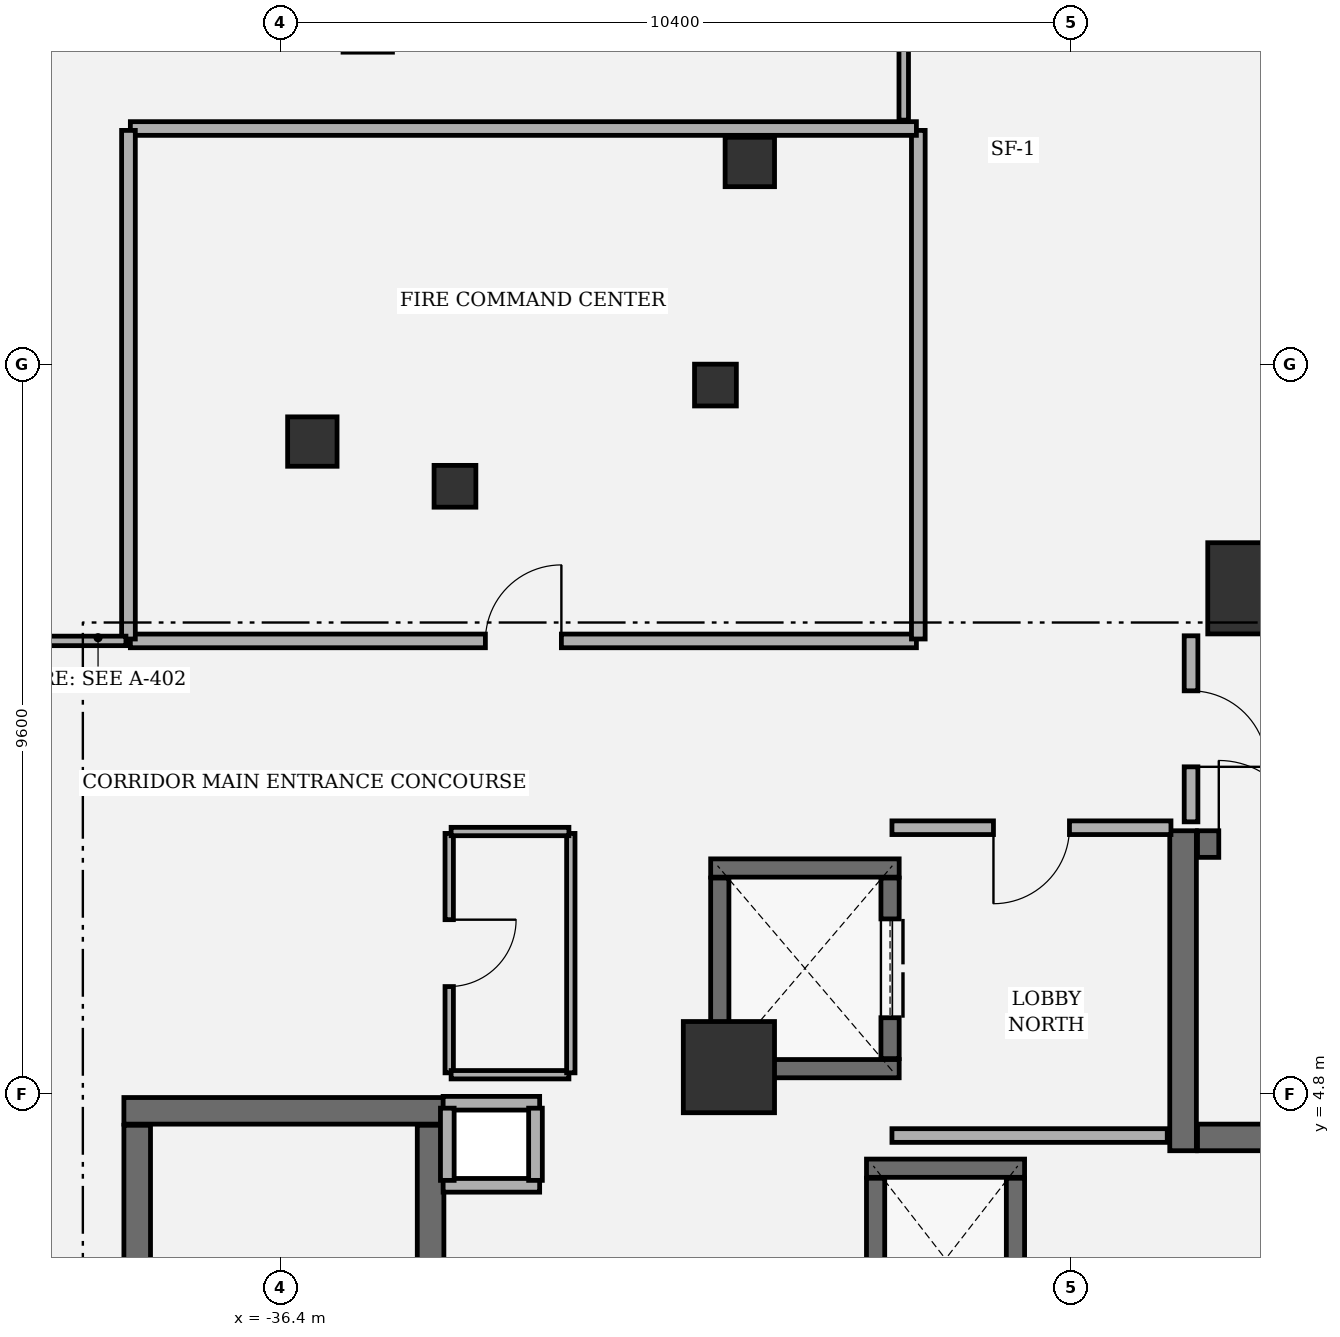
"""IFC4 building model, lengths in metres.
Left out: names, types, materials, properties, quantities, classifications, styles, units other than length and angle.
Written with IfcOpenShell. Run it as: python <this file> out.ifc"""

import sys

from ifc_helpers import new_model, si_unit, direction, frame, frame_2d, origin, origin_2d, place, context, subcontext, project, spatial, rectangle, extrude, element, fill, save


model = new_model("IFC4")
c1 = context("Model", 3, precision=1e-05, world=origin(), true_north=direction((0.0, 1.0)))
c2 = subcontext(c1, "Body", "Model", "MODEL_VIEW")
j1 = project(units=[si_unit("LENGTHUNIT", "METRE"), si_unit("PLANEANGLEUNIT", "RADIAN")], contexts=[c1])
p1 = place(None, origin())
s1 = spatial("IfcSite", under=j1, at=p1, CompositionType="ELEMENT")
p2 = place(p1, origin())
s2 = spatial("IfcBuilding", under=s1, at=p2, CompositionType="ELEMENT")
p3 = place(p2, origin())
s3 = spatial("IfcBuildingStorey", under=s2, at=p3, CompositionType="ELEMENT", Elevation=0.0)
for number, where, z_axis, x_axis in (
    (1, (-23.6, 11.45, 0.0), (0.0, 0.0, 1.0), (1.0, 0.0, 0.0)),
    (2, (-30.5, 5.15, 0.0), (0.0, 0.0, 1.0), (1.0, 0.0, 0.0)),
):
    element("IfcColumn", number, at=place(p3, frame(where, z_axis=z_axis, x_axis=x_axis)), inside=s3, PredefinedType="COLUMN", context=c2, shape_type="SweptSolid", body=[
        extrude(rectangle(XDim=1.2, YDim=1.2, at=origin_2d()), origin(), (0.0, 0.0, 1.0), 6.6),
    ])
for number, where, z_axis, x_axis in (
    (3, (-35.981, 13.381, 0.0), (0.0, 0.0, 1.0), (1.0, 0.0, 0.0)),
    (4, (-30.225, 17.06, 0.0), (0.0, 0.0, 1.0), (1.0, 0.0, 0.0)),
):
    element("IfcColumn", number, at=place(p3, frame(where, z_axis=z_axis, x_axis=x_axis)), inside=s3, PredefinedType="COLUMN", context=c2, shape_type="SweptSolid", body=[
        extrude(rectangle(XDim=0.65, YDim=0.65, at=origin_2d()), origin(), (0.0, 0.0, 1.0), 6.6),
    ])
for number, where, z_axis, x_axis in (
    (5, (-34.104, 12.792, 0.0), (0.0, 0.0, 1.0), (1.0, 0.0, 0.0)),
    (6, (-30.677, 14.124, 0.0), (0.0, 0.0, 1.0), (1.0, 0.0, 0.0)),
):
    element("IfcColumn", number, at=place(p3, frame(where, z_axis=z_axis, x_axis=x_axis)), inside=s3, PredefinedType="COLUMN", context=c2, shape_type="SweptSolid", body=[
        extrude(rectangle(XDim=0.55, YDim=0.55, at=origin_2d()), origin(), (0.0, 0.0, 1.0), 6.6),
    ])
p4 = place(p3, frame((-64.419, 4.637, 0.0), z_axis=(0.0, 0.0, 1.0), x_axis=(0.842602364841, 0.538536214905, 0.0)))
e7 = element("IfcWall", 7, at=p4, inside=s3, PredefinedType="SOLIDWALL", context=c2, shape_type="SweptSolid", body=[
    extrude(rectangle(XDim=60.27, YDim=0.38, at=frame_2d((30.135, 0.0))), origin(), (0.0, 0.0, 1.0), 6.34),
])
p5 = place(p4, frame((51.698, 0.0, 0.0)))
e8 = element("IfcOpeningElement", 8, at=p5, cuts=e7, PredefinedType="OPENING", context=c2, shape_type="SweptSolid", body=[
    extrude(rectangle(XDim=1.8, YDim=2.35, at=frame_2d((0.9, 1.175))), frame((0.0, 0.2, 0.0), z_axis=(0.0, -1.0, 0.0), x_axis=(1.0, 0.0, 0.0)), (0.0, 0.0, 1.0), 0.4),
])
p6 = place(p4, frame((44.021, 0.0, 0.0)))
e9 = element("IfcOpeningElement", 9, at=p6, cuts=e7, PredefinedType="OPENING", context=c2, shape_type="SweptSolid", body=[
    extrude(rectangle(XDim=2.2, YDim=2.4, at=frame_2d((1.1, 1.2))), frame((0.0, 0.2, 0.0), z_axis=(0.0, -1.0, 0.0), x_axis=(1.0, 0.0, 0.0)), (0.0, 0.0, 1.0), 0.4),
])
p7 = place(p3, frame((-24.525, 8.26, 0.0), z_axis=(0.0, 0.0, 1.0), x_axis=(0.0, -1.0, 0.0)))
e10 = element("IfcWall", 10, at=p7, inside=s3, PredefinedType="SHEAR", context=c2, shape_type="SweptSolid", body=[
    extrude(rectangle(XDim=4.21, YDim=0.35, at=frame_2d((2.105, 0.0))), origin(), (0.0, 0.0, 1.0), 6.34),
])
p8 = place(p3, frame((-24.335, 4.225, 0.0), z_axis=(0.0, 0.0, 1.0), x_axis=(1.0, 0.0, 0.0)))
e11 = element("IfcWall", 11, at=p8, inside=s3, PredefinedType="SHEAR", context=c2, shape_type="SweptSolid", body=[
    extrude(rectangle(XDim=8.12, YDim=0.35, at=frame_2d((4.06, 0.0))), origin(), (0.0, 0.0, 1.0), 6.34),
])
p9 = place(p3, frame((-24.335, 8.085, 0.0), z_axis=(0.0, 0.0, 1.0), x_axis=(1.0, 0.0, 0.0)))
e12 = element("IfcWall", 12, at=p9, inside=s3, PredefinedType="SHEAR", context=c2, shape_type="SweptSolid", body=[
    extrude(rectangle(XDim=8.12, YDim=0.35, at=frame_2d((4.06, 0.0))), origin(), (0.0, 0.0, 1.0), 6.34),
])
p10 = place(p9, frame((0.28, 0.0, 0.0)))
e13 = element("IfcOpeningElement", 13, at=p10, cuts=e12, PredefinedType="OPENING", context=c2, shape_type="SweptSolid", body=[
    extrude(rectangle(XDim=1.1, YDim=2.2, at=frame_2d((0.55, 1.1))), frame((0.0, 0.185, 0.0), z_axis=(0.0, -1.0, 0.0), x_axis=(1.0, 0.0, 0.0)), (0.0, 0.0, 1.0), 0.37),
])
p11 = place(p3, frame((-34.25, 4.575, 0.0), z_axis=(0.0, 0.0, 1.0), x_axis=(-1.0, 0.0, 0.0)))
e14 = element("IfcWall", 14, at=p11, inside=s3, PredefinedType="SHEAR", context=c2, shape_type="SweptSolid", body=[
    extrude(rectangle(XDim=4.21, YDim=0.35, at=frame_2d((2.105, 0.0))), origin(), (0.0, 0.0, 1.0), 6.34),
])
for number, where, z_axis, x_axis in (
    (15, (-34.425, -4.385, 0.0), (0.0, 0.0, 1.0), (0.0, 1.0, 0.0)),
    (16, (-38.285, 4.385, 0.0), (0.0, 0.0, 1.0), (0.0, -1.0, 0.0)),
):
    element("IfcWall", number, at=place(p3, frame(where, z_axis=z_axis, x_axis=x_axis)), inside=s3, PredefinedType="SHEAR", context=c2, shape_type="SweptSolid", body=[
        extrude(rectangle(XDim=8.77, YDim=0.35, at=frame_2d((4.385, 0.0))), origin(), (0.0, 0.0, 1.0), 6.34),
    ])
for number, where, z_axis, x_axis in (
    (17, (-28.26, 5.13, 0.0), (0.0, 0.0, 1.0), (-1.0, 0.0, 0.0)),
    (18, (-30.74, 7.77, 0.0), (0.0, 0.0, 1.0), (1.0, 0.0, 0.0)),
):
    element("IfcWall", number, at=place(p3, frame(where, z_axis=z_axis, x_axis=x_axis)), inside=s3, PredefinedType="SHEAR", context=c2, shape_type="SweptSolid", body=[
        extrude(rectangle(XDim=2.48, YDim=0.24, at=frame_2d((1.24, 0.0))), origin(), (0.0, 0.0, 1.0), 6.34),
    ])
p12 = place(p3, frame((-30.62, 5.262, 0.0), z_axis=(0.0, 0.0, 1.0), x_axis=(0.0, 1.0, 0.0)))
e19 = element("IfcWall", 19, at=p12, inside=s3, PredefinedType="SHEAR", context=c2, shape_type="SweptSolid", body=[
    extrude(rectangle(XDim=2.376, YDim=0.24, at=frame_2d((1.188, 0.0))), origin(), (0.0, 0.0, 1.0), 6.34),
])
p13 = place(p3, frame((-28.38, 7.638, 0.0), z_axis=(0.0, 0.0, 1.0), x_axis=(0.0, -1.0, 0.0)))
e20 = element("IfcWall", 20, at=p13, inside=s3, PredefinedType="SHEAR", context=c2, shape_type="SweptSolid", body=[
    extrude(rectangle(XDim=2.376, YDim=0.24, at=frame_2d((1.188, 0.0))), origin(), (0.0, 0.0, 1.0), 6.34),
])
p14 = place(p13, frame((0.538, 0.0, 0.0)))
e21 = element("IfcOpeningElement", 21, at=p14, cuts=e20, PredefinedType="OPENING", context=c2, shape_type="SweptSolid", body=[
    extrude(rectangle(XDim=1.3, YDim=2.3, at=frame_2d((0.65, 1.15))), frame((0.0, 0.13, 0.0), z_axis=(0.0, -1.0, 0.0), x_axis=(1.0, 0.0, 0.0)), (0.0, 0.0, 1.0), 0.26),
])
p15 = place(p3, frame((-28.69, 3.82, 0.0), z_axis=(0.0, 0.0, 1.0), x_axis=(1.0, 0.0, 0.0)))
e22 = element("IfcWall", 22, at=p15, inside=s3, PredefinedType="SHEAR", context=c2, shape_type="SweptSolid", body=[
    extrude(rectangle(XDim=2.08, YDim=0.24, at=frame_2d((1.04, 0.0))), origin(), (0.0, 0.0, 1.0), 6.34),
])
for number, where, z_axis, x_axis in (
    (23, (-28.57, 1.562, 0.0), (0.0, 0.0, 1.0), (0.0, 1.0, 0.0)),
    (24, (-26.73, 3.688, 0.0), (0.0, 0.0, 1.0), (0.0, -1.0, 0.0)),
):
    element("IfcWall", number, at=place(p3, frame(where, z_axis=z_axis, x_axis=x_axis)), inside=s3, PredefinedType="SHEAR", context=c2, shape_type="SweptSolid", body=[
        extrude(rectangle(XDim=2.126, YDim=0.24, at=frame_2d((1.063, 0.0))), origin(), (0.0, 0.0, 1.0), 6.34),
    ])
for number, where, z_axis, x_axis in (
    (25, (-32.99, 3.595, 0.0), (0.0, 0.0, 1.0), (-1.0, 0.0, 0.0)),
    (26, (-34.26, 4.675, 0.0), (0.0, 0.0, 1.0), (1.0, 0.0, 0.0)),
):
    element("IfcWall", number, at=place(p3, frame(where, z_axis=z_axis, x_axis=x_axis)), inside=s3, PredefinedType="PARTITIONING", context=c2, shape_type="SweptSolid", body=[
        extrude(rectangle(XDim=1.27, YDim=0.18, at=frame_2d((0.635, 0.0))), origin(), (0.0, 0.0, 1.0), 6.34),
    ])
for number, where, z_axis, x_axis in (
    (27, (-34.205, 3.66, 0.0), (0.0, 0.0, 1.0), (0.0, 1.0, 0.0)),
    (28, (-33.045, 4.61, 0.0), (0.0, 0.0, 1.0), (0.0, -1.0, 0.0)),
):
    element("IfcWall", number, at=place(p3, frame(where, z_axis=z_axis, x_axis=x_axis)), inside=s3, PredefinedType="PARTITIONING", context=c2, shape_type="SweptSolid", body=[
        extrude(rectangle(XDim=0.95, YDim=0.18, at=frame_2d((0.475, 0.0))), origin(), (0.0, 0.0, 1.0), 6.34),
    ])
p16 = place(p3, frame((-24.42, 10.825, 0.0), z_axis=(0.0, 0.0, 1.0), x_axis=(0.0, -1.0, 0.0)))
e29 = element("IfcWall", 29, at=p16, inside=s3, PredefinedType="PARTITIONING", context=c2, shape_type="SweptSolid", body=[
    extrude(rectangle(XDim=2.448, YDim=0.18, at=frame_2d((1.224, 0.0))), origin(), (0.0, 0.0, 1.0), 5.853),
])
p17 = place(p16, frame((0.724, 0.0, 0.0)))
e30 = element("IfcOpeningElement", 30, at=p17, cuts=e29, PredefinedType="OPENING", context=c2, shape_type="SweptSolid", body=[
    extrude(rectangle(XDim=1.0, YDim=2.15, at=frame_2d((0.5, 1.075))), frame((0.0, 0.1, 0.0), z_axis=(0.0, -1.0, 0.0), x_axis=(1.0, 0.0, 0.0)), (0.0, 0.0, 1.0), 0.2),
])
p18 = place(p3, frame((-28.355, 4.25, 0.0), z_axis=(0.0, 0.0, 1.0), x_axis=(1.0, 0.0, 0.0)))
e31 = element("IfcWall", 31, at=p18, inside=s3, PredefinedType="PARTITIONING", context=c2, shape_type="SweptSolid", body=[
    extrude(rectangle(XDim=3.622, YDim=0.18, at=frame_2d((1.811, 0.0))), origin(), (0.0, 0.0, 1.0), 6.34),
])
p19 = place(p3, frame((-24.684, 8.3, 0.0), z_axis=(0.0, 0.0, 1.0), x_axis=(-1.0, 0.0, 0.0)))
e32 = element("IfcWall", 32, at=p19, inside=s3, PredefinedType="PARTITIONING", context=c2, shape_type="SweptSolid", body=[
    extrude(rectangle(XDim=3.671, YDim=0.18, at=frame_2d((1.835, 0.0))), origin(), (0.0, 0.0, 1.0), 5.853),
])
p20 = place(p19, frame((1.335, 0.0, 0.0)))
e33 = element("IfcOpeningElement", 33, at=p20, cuts=e32, PredefinedType="OPENING", context=c2, shape_type="SweptSolid", body=[
    extrude(rectangle(XDim=1.0, YDim=2.15, at=frame_2d((0.5, 1.075))), frame((0.0, 0.1, 0.0), z_axis=(0.0, -1.0, 0.0), x_axis=(1.0, 0.0, 0.0)), (0.0, 0.0, 1.0), 0.2),
])
p21 = place(p3, frame((-34.18, 8.225, 0.0), z_axis=(0.0, 0.0, 1.0), x_axis=(0.0, -1.0, 0.0)))
e34 = element("IfcWall", 34, at=p21, inside=s3, PredefinedType="PARTITIONING", context=c2, shape_type="SweptSolid", body=[
    extrude(rectangle(XDim=3.15, YDim=0.11, at=frame_2d((1.575, 0.0))), origin(), (0.0, 0.0, 1.0), 6.34),
])
p22 = place(p21, frame((1.135, 0.0, 0.0)))
e35 = element("IfcOpeningElement", 35, at=p22, cuts=e34, PredefinedType="OPENING", context=c2, shape_type="SweptSolid", body=[
    extrude(rectangle(XDim=0.88, YDim=2.1, at=frame_2d((0.44, 1.05))), frame((0.0, 0.065, 0.0), z_axis=(0.0, -1.0, 0.0), x_axis=(1.0, 0.0, 0.0)), (0.0, 0.0, 1.0), 0.13),
])
p23 = place(p3, frame((-34.155, 5.05, 0.0), z_axis=(0.0, 0.0, 1.0), x_axis=(1.0, 0.0, 0.0)))
e36 = element("IfcWall", 36, at=p23, inside=s3, PredefinedType="PARTITIONING", context=c2, shape_type="SweptSolid", body=[
    extrude(rectangle(XDim=1.55, YDim=0.11, at=frame_2d((0.775, 0.0))), origin(), (0.0, 0.0, 1.0), 6.34),
])
p24 = place(p3, frame((-32.58, 5.075, 0.0), z_axis=(0.0, 0.0, 1.0), x_axis=(0.0, 1.0, 0.0)))
e37 = element("IfcWall", 37, at=p24, inside=s3, PredefinedType="PARTITIONING", context=c2, shape_type="SweptSolid", body=[
    extrude(rectangle(XDim=3.15, YDim=0.11, at=frame_2d((1.575, 0.0))), origin(), (0.0, 0.0, 1.0), 6.34),
])
p25 = place(p3, frame((-32.605, 8.25, 0.0), z_axis=(0.0, 0.0, 1.0), x_axis=(-1.0, 0.0, 0.0)))
e38 = element("IfcWall", 38, at=p25, inside=s3, PredefinedType="PARTITIONING", context=c2, shape_type="SweptSolid", body=[
    extrude(rectangle(XDim=1.55, YDim=0.11, at=frame_2d((0.775, 0.0))), origin(), (0.0, 0.0, 1.0), 5.853),
])
p26 = place(p3, frame((-38.375, 10.758, 0.0), z_axis=(0.0, 0.0, 1.0), x_axis=(1.0, 0.0, 0.0)))
e39 = element("IfcWall", 39, at=p26, inside=s3, PredefinedType="PARTITIONING", context=c2, shape_type="SweptSolid", body=[
    extrude(rectangle(XDim=10.342, YDim=0.18, at=frame_2d((5.171, 0.0))), origin(), (0.0, 0.0, 1.0), 5.853),
])
p27 = place(p26, frame((4.671, 0.0, 0.0)))
e40 = element("IfcOpeningElement", 40, at=p27, cuts=e39, PredefinedType="OPENING", context=c2, shape_type="SweptSolid", body=[
    extrude(rectangle(XDim=1.0, YDim=2.15, at=frame_2d((0.5, 1.075))), frame((0.0, 0.1, 0.0), z_axis=(0.0, -1.0, 0.0), x_axis=(1.0, 0.0, 0.0)), (0.0, 0.0, 1.0), 0.2),
])
p28 = place(p3, frame((-28.008, 10.783, 0.0), z_axis=(0.0, 0.0, 1.0), x_axis=(0.0, 1.0, 0.0)))
e41 = element("IfcWall", 41, at=p28, inside=s3, PredefinedType="PARTITIONING", context=c2, shape_type="SweptSolid", body=[
    extrude(rectangle(XDim=6.692, YDim=0.18, at=frame_2d((3.346, 0.0))), origin(), (0.0, 0.0, 1.0), 5.853),
])
p29 = place(p3, frame((-28.033, 17.5, 0.0), z_axis=(0.0, 0.0, 1.0), x_axis=(-1.0, 0.0, 0.0)))
e42 = element("IfcWall", 42, at=p29, inside=s3, PredefinedType="PARTITIONING", context=c2, shape_type="SweptSolid", body=[
    extrude(rectangle(XDim=10.342, YDim=0.18, at=frame_2d((5.171, 0.0))), origin(), (0.0, 0.0, 1.0), 5.31),
])
p30 = place(p3, frame((-38.4, 17.475, 0.0), z_axis=(0.0, 0.0, 1.0), x_axis=(0.0, -1.0, 0.0)))
e43 = element("IfcWall", 43, at=p30, inside=s3, PredefinedType="PARTITIONING", context=c2, shape_type="SweptSolid", body=[
    extrude(rectangle(XDim=6.692, YDim=0.18, at=frame_2d((3.346, 0.0))), origin(), (0.0, 0.0, 1.0), 6.34),
])
p31 = place(p3, frame((-41.233, 10.758, 0.0), z_axis=(0.0, 0.0, 1.0), x_axis=(1.0, 0.0, 0.0)))
e44 = element("IfcWall", 44, at=p31, inside=s3, PredefinedType="PARTITIONING", context=c2, shape_type="SweptSolid", body=[
    extrude(rectangle(XDim=2.8, YDim=0.125, at=frame_2d((1.4, 0.0))), origin(), (0.0, 0.0, 1.0), 6.34),
])
p32 = place(p3, frame((-28.2, 17.61, 0.0), z_axis=(0.0, 0.0, 1.0), x_axis=(0.0, 1.0, 0.0)))
e45 = element("IfcWall", 45, at=p32, inside=s3, PredefinedType="PARTITIONING", context=c2, shape_type="SweptSolid", body=[
    extrude(rectangle(XDim=10.095, YDim=0.125, at=frame_2d((5.048, 0.0))), origin(), (0.0, 0.0, 1.0), 5.853),
])
p33 = place(p32, frame((4.573, 0.0, 0.0)))
e46 = element("IfcOpeningElement", 46, at=p33, cuts=e45, PredefinedType="OPENING", context=c2, shape_type="SweptSolid", body=[
    extrude(rectangle(XDim=0.95, YDim=2.15, at=frame_2d((0.475, 1.075))), frame((0.0, 0.073, 0.0), z_axis=(0.0, -1.0, 0.0), x_axis=(1.0, 0.0, 0.0)), (0.0, 0.0, 1.0), 0.145),
])
p34 = place(p10, origin())
e47 = element("IfcDoor", 47, at=p34, inside=s3, OperationType="SINGLE_SWING_LEFT", PredefinedType="DOOR", context=c2, shape_type="SweptSolid", body=[
    extrude(rectangle(XDim=1.1, YDim=2.2, at=frame_2d((0.55, 1.1))), frame((0.0, 0.025, 0.0), z_axis=(0.0, -1.0, 0.0), x_axis=(1.0, 0.0, 0.0)), (0.0, 0.0, 1.0), 0.05),
])
fill(e13, e47)
p35 = place(p14, origin())
e48 = element("IfcDoor", 48, at=p35, inside=s3, OperationType="DOUBLE_DOOR_SLIDING", PredefinedType="DOOR", context=c2, shape_type="SweptSolid", body=[
    extrude(rectangle(XDim=1.3, YDim=2.3, at=frame_2d((0.65, 1.15))), frame((0.0, 0.025, 0.0), z_axis=(0.0, -1.0, 0.0), x_axis=(1.0, 0.0, 0.0)), (0.0, 0.0, 1.0), 0.05),
])
fill(e21, e48)
p36 = place(p17, origin())
e49 = element("IfcDoor", 49, at=p36, inside=s3, OperationType="SINGLE_SWING_RIGHT", PredefinedType="DOOR", context=c2, shape_type="SweptSolid", body=[
    extrude(rectangle(XDim=1.0, YDim=2.15, at=frame_2d((0.5, 1.075))), frame((0.0, 0.025, 0.0), z_axis=(0.0, -1.0, 0.0), x_axis=(1.0, 0.0, 0.0)), (0.0, 0.0, 1.0), 0.05),
])
fill(e30, e49)
p37 = place(p22, origin())
e50 = element("IfcDoor", 50, at=p37, inside=s3, OperationType="SINGLE_SWING_LEFT", PredefinedType="DOOR", context=c2, shape_type="SweptSolid", body=[
    extrude(rectangle(XDim=0.88, YDim=2.1, at=frame_2d((0.44, 1.05))), frame((0.0, 0.025, 0.0), z_axis=(0.0, -1.0, 0.0), x_axis=(1.0, 0.0, 0.0)), (0.0, 0.0, 1.0), 0.05),
])
fill(e35, e50)
p38 = place(p27, origin())
e51 = element("IfcDoor", 51, at=p38, inside=s3, OperationType="SINGLE_SWING_RIGHT", PredefinedType="DOOR", context=c2, shape_type="SweptSolid", body=[
    extrude(rectangle(XDim=1.0, YDim=2.15, at=frame_2d((0.5, 1.075))), frame((0.0, 0.025, 0.0), z_axis=(0.0, -1.0, 0.0), x_axis=(1.0, 0.0, 0.0)), (0.0, 0.0, 1.0), 0.05),
])
fill(e40, e51)
p39 = place(p20, origin())
e52 = element("IfcDoor", 52, at=p39, inside=s3, OperationType="SINGLE_SWING_RIGHT", PredefinedType="DOOR", context=c2, shape_type="SweptSolid", body=[
    extrude(rectangle(XDim=1.0, YDim=2.15, at=frame_2d((0.5, 1.075))), frame((0.0, 0.025, 0.0), z_axis=(0.0, -1.0, 0.0), x_axis=(1.0, 0.0, 0.0)), (0.0, 0.0, 1.0), 0.05),
])
fill(e33, e52)
save(model, sys.argv[1])
